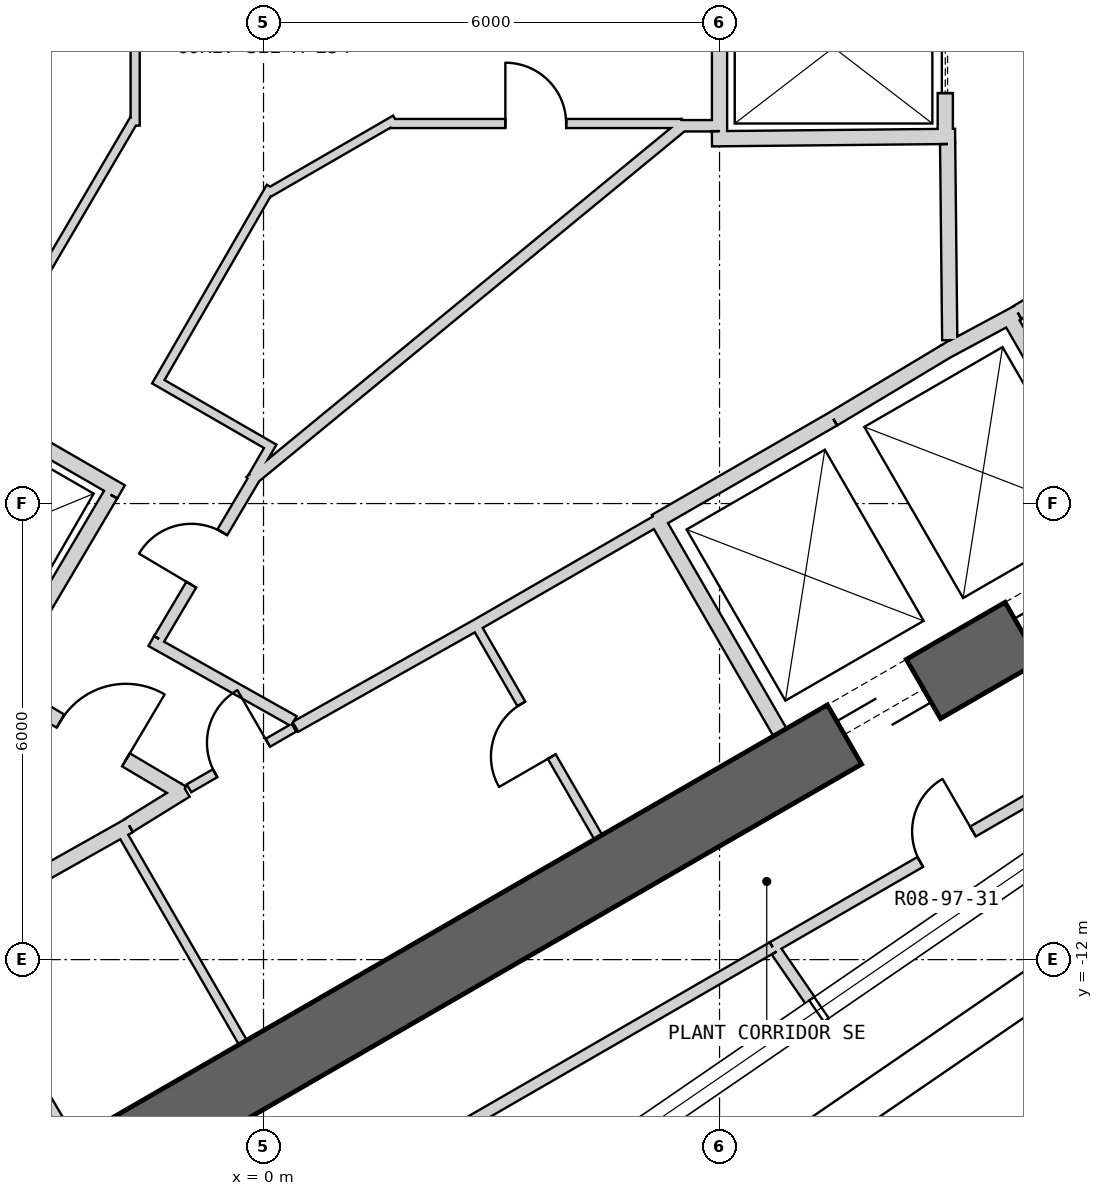
"""IFC4 building model, lengths in metres.
Left out: names, types, materials, properties, quantities, classifications, styles, units other than length and angle.
Written with IfcOpenShell. Run it as: python <this file> out.ifc"""

import sys

from ifc_helpers import new_model, si_unit, direction, frame, frame_2d, origin, place, context, subcontext, project, spatial, rectangle, extrude, element, fill, save


model = new_model("IFC4")
c1 = context("Model", 3, precision=1e-05, world=origin(), true_north=direction((0.0, 1.0)))
c2 = subcontext(c1, "Body", "Model", "MODEL_VIEW")
j1 = project(units=[si_unit("LENGTHUNIT", "METRE"), si_unit("PLANEANGLEUNIT", "RADIAN")], contexts=[c1])
p1 = place(None, origin())
s1 = spatial("IfcSite", under=j1, at=p1, CompositionType="ELEMENT")
p2 = place(p1, origin())
s2 = spatial("IfcBuilding", under=s1, at=p2, CompositionType="ELEMENT")
p3 = place(p2, frame((0.0, 0.0, 430.3)))
s3 = spatial("IfcBuildingStorey", under=s2, at=p3, CompositionType="ELEMENT", Elevation=430.3)
p4 = place(p3, frame((-7.825, -17.97, 0.0), z_axis=(0.0, 0.0, 1.0), x_axis=(0.866028369851, 0.499994862586, 0.0)))
e1 = element("IfcWall", 1, at=p4, inside=s3, PredefinedType="SHEAR", context=c2, shape_type="SweptSolid", body=[
    extrude(rectangle(XDim=31.523, YDim=0.9, at=frame_2d((15.762, 0.0))), origin(), (0.0, 0.0, 1.0), 5.0),
])
p5 = place(p4, frame((17.862, 0.0, 0.0)))
e2 = element("IfcOpeningElement", 2, at=p5, cuts=e1, PredefinedType="OPENING", context=c2, shape_type="SweptSolid", body=[
    extrude(rectangle(XDim=1.2, YDim=2.4, at=frame_2d((0.6, 1.2))), frame((0.0, 0.46, 0.0), z_axis=(0.0, -1.0, 0.0), x_axis=(1.0, 0.0, 0.0)), (0.0, 0.0, 1.0), 0.92),
])
p6 = place(p4, frame((20.562, 0.0, 0.0)))
e3 = element("IfcOpeningElement", 3, at=p6, cuts=e1, PredefinedType="OPENING", context=c2, shape_type="SweptSolid", body=[
    extrude(rectangle(XDim=1.2, YDim=2.4, at=frame_2d((0.6, 1.2))), frame((0.0, 0.46, 0.0), z_axis=(0.0, -1.0, 0.0), x_axis=(1.0, 0.0, 0.0)), (0.0, 0.0, 1.0), 0.92),
])
p7 = place(p4, frame((26.712, 0.0, 0.0)))
e4 = element("IfcOpeningElement", 4, at=p7, cuts=e1, PredefinedType="OPENING", context=c2, shape_type="SweptSolid", body=[
    extrude(rectangle(XDim=1.2, YDim=2.4, at=frame_2d((0.6, 1.2))), frame((0.0, 0.46, 0.0), z_axis=(0.0, -1.0, 0.0), x_axis=(1.0, 0.0, 0.0)), (0.0, 0.0, 1.0), 0.92),
])
p8 = place(p4, frame((3.612, 0.0, 0.0)))
e5 = element("IfcOpeningElement", 5, at=p8, cuts=e1, PredefinedType="OPENING", context=c2, shape_type="SweptSolid", body=[
    extrude(rectangle(XDim=1.2, YDim=2.4, at=frame_2d((0.6, 1.2))), frame((0.0, 0.46, 0.0), z_axis=(0.0, -1.0, 0.0), x_axis=(1.0, 0.0, 0.0)), (0.0, 0.0, 1.0), 0.92),
])
p9 = place(p3, frame((6.795, -9.01, 0.0), z_axis=(0.0, 0.0, 1.0), x_axis=(-0.499984717929, 0.866034226713, 0.0)))
e6 = element("IfcWall", 6, at=p9, inside=s3, PredefinedType="PLUMBINGWALL", context=c2, shape_type="SweptSolid", body=[
    extrude(rectangle(XDim=3.25, YDim=0.2, at=frame_2d((1.625, 0.0))), origin(), (0.0, 0.0, 1.0), 4.75),
])
p10 = place(p3, frame((5.159, -6.236, 0.0), z_axis=(0.0, 0.0, 1.0), x_axis=(0.866036505625, 0.499980770555, 0.0)))
e7 = element("IfcWall", 7, at=p10, inside=s3, PredefinedType="PLUMBINGWALL", context=c2, shape_type="SweptSolid", body=[
    extrude(rectangle(XDim=2.7, YDim=0.2, at=frame_2d((1.35, 0.0))), origin(), (0.0, 0.0, 1.0), 4.75),
])
p11 = place(p3, frame((9.795, -3.525, 0.0), z_axis=(0.0, 0.0, 1.0), x_axis=(0.499984717929, -0.866034226713, 0.0)))
e8 = element("IfcWall", 8, at=p11, inside=s3, PredefinedType="PLUMBINGWALL", context=c2, shape_type="SweptSolid", body=[
    extrude(rectangle(XDim=3.25, YDim=0.2, at=frame_2d((1.625, 0.0))), origin(), (0.0, 0.0, 1.0), 4.75),
])
p12 = place(p3, frame((8.974, -3.999, 0.0), z_axis=(0.0, 0.0, 1.0), x_axis=(0.880907015104, 0.473289373154, 0.0)))
e9 = element("IfcWall", 9, at=p12, inside=s3, PredefinedType="PLUMBINGWALL", context=c2, shape_type="SweptSolid", body=[
    extrude(rectangle(XDim=1.078, YDim=0.2, at=frame_2d((0.539, 0.0))), origin(), (0.0, 0.0, 1.0), 4.75),
])
p13 = place(p3, frame((7.497, -4.886, 0.0), z_axis=(0.0, 0.0, 1.0), x_axis=(0.857516281273, 0.51445682749, 0.0)))
e10 = element("IfcWall", 10, at=p13, inside=s3, PredefinedType="PLUMBINGWALL", context=c2, shape_type="SweptSolid", body=[
    extrude(rectangle(XDim=1.845, YDim=0.2, at=frame_2d((0.922, 0.0))), origin(), (0.0, 0.0, 1.0), 4.75),
])
p14 = place(p3, frame((8.97, 1.2, 0.0), z_axis=(0.0, 0.0, 1.0), x_axis=(0.0, -1.0, 0.0)))
e11 = element("IfcWall", 11, at=p14, inside=s3, PredefinedType="PLUMBINGWALL", context=c2, shape_type="SweptSolid", body=[
    extrude(rectangle(XDim=2.4, YDim=0.2, at=frame_2d((1.2, 0.0))), origin(), (0.0, 0.0, 1.0), 4.75),
])
p15 = place(p14, frame((0.6, 0.0, 0.0)))
e12 = element("IfcOpeningElement", 12, at=p15, cuts=e11, PredefinedType="OPENING", context=c2, shape_type="SweptSolid", body=[
    extrude(rectangle(XDim=1.2, YDim=2.4, at=frame_2d((0.6, 1.2))), frame((0.0, 0.11, 0.0), z_axis=(0.0, -1.0, 0.0), x_axis=(1.0, 0.0, 0.0)), (0.0, 0.0, 1.0), 0.22),
])
p16 = place(p3, frame((9.1, -1.169, 0.0), z_axis=(0.0, 0.0, 1.0), x_axis=(-0.999950064753, -0.009993397809, 0.0)))
e13 = element("IfcWall", 13, at=p16, inside=s3, PredefinedType="PLUMBINGWALL", context=c2, shape_type="SweptSolid", body=[
    extrude(rectangle(XDim=3.2, YDim=0.2, at=frame_2d((1.6, 0.0))), origin(), (0.0, 0.0, 1.0), 4.75),
])
p17 = place(p3, frame((6.0, -1.1, 0.0), z_axis=(0.0, 0.0, 1.0), x_axis=(0.0, 1.0, 0.0)))
e14 = element("IfcWall", 14, at=p17, inside=s3, PredefinedType="PLUMBINGWALL", context=c2, shape_type="SweptSolid", body=[
    extrude(rectangle(XDim=2.4, YDim=0.2, at=frame_2d((1.2, 0.0))), origin(), (0.0, 0.0, 1.0), 4.75),
])
p18 = place(p3, frame((-3.953, -4.646, 0.0), z_axis=(0.0, 0.0, 1.0), x_axis=(0.866024647952, -0.500001309137, 0.0)))
e15 = element("IfcWall", 15, at=p18, inside=s3, PredefinedType="PLUMBINGWALL", context=c2, shape_type="SweptSolid", body=[
    extrude(rectangle(XDim=2.4, YDim=0.2, at=frame_2d((1.2, 0.0))), origin(), (0.0, 0.0, 1.0), 4.75),
])
p19 = place(p3, frame((-2.012, -5.882, 0.0), z_axis=(0.0, 0.0, 1.0), x_axis=(-0.508619639323, -0.860991325447, 0.0)))
e16 = element("IfcWall", 16, at=p19, inside=s3, PredefinedType="PLUMBINGWALL", context=c2, shape_type="SweptSolid", body=[
    extrude(rectangle(XDim=3.0, YDim=0.2, at=frame_2d((1.5, 0.0))), origin(), (0.0, 0.0, 1.0), 4.75),
])
p20 = place(p3, frame((-1.897, -10.275, 0.0), z_axis=(0.0, 0.0, 1.0), x_axis=(0.499984717929, -0.866034226713, 0.0)))
e17 = element("IfcWall", 17, at=p20, inside=s3, PredefinedType="PARTITIONING", context=c2, shape_type="SweptSolid", body=[
    extrude(rectangle(XDim=3.25, YDim=0.12, at=frame_2d((1.625, 0.0))), origin(), (0.0, 0.0, 1.0), 4.75),
])
p21 = place(p3, frame((-4.26, -11.524, 0.0), z_axis=(0.0, 0.0, 1.0), x_axis=(0.507997497166, -0.861358544901, 0.0)))
e18 = element("IfcWall", 18, at=p21, inside=s3, PredefinedType="PARTITIONING", context=c2, shape_type="SweptSolid", body=[
    extrude(rectangle(XDim=3.35, YDim=0.2, at=frame_2d((1.675, 0.0))), origin(), (0.0, 0.0, 1.0), 4.75),
])
p22 = place(p21, frame((1.325, 0.0, 0.0)))
e19 = element("IfcOpeningElement", 19, at=p22, cuts=e18, PredefinedType="OPENING", context=c2, shape_type="SweptSolid", body=[
    extrude(rectangle(XDim=0.8, YDim=2.1, at=frame_2d((0.4, 1.05))), frame((0.0, 0.11, 0.0), z_axis=(0.0, -1.0, 0.0), x_axis=(1.0, 0.0, 0.0)), (0.0, 0.0, 1.0), 0.22),
])
p23 = place(p3, frame((-1.769, -10.237, 0.0), z_axis=(0.0, 0.0, 1.0), x_axis=(-0.871534483978, -0.490334215854, 0.0)))
e20 = element("IfcWall", 20, at=p23, inside=s3, PredefinedType="PARTITIONING", context=c2, shape_type="SweptSolid", body=[
    extrude(rectangle(XDim=2.7, YDim=0.2, at=frame_2d((1.35, 0.0))), origin(), (0.0, 0.0, 1.0), 4.75),
])
p24 = place(p3, frame((4.405, -10.389, 0.0), z_axis=(0.0, 0.0, 1.0), x_axis=(-0.500017246033, 0.866015446554, 0.0)))
e21 = element("IfcWall", 21, at=p24, inside=s3, PredefinedType="PARTITIONING", context=c2, shape_type="SweptSolid", body=[
    extrude(rectangle(XDim=3.25, YDim=0.12, at=frame_2d((1.625, 0.0))), origin(), (0.0, 0.0, 1.0), 4.75),
])
p25 = place(p24, frame((1.225, 0.0, 0.0)))
e22 = element("IfcOpeningElement", 22, at=p25, cuts=e21, PredefinedType="OPENING", context=c2, shape_type="SweptSolid", body=[
    extrude(rectangle(XDim=0.8, YDim=2.1, at=frame_2d((0.4, 1.05))), frame((0.0, 0.07, 0.0), z_axis=(0.0, -1.0, 0.0), x_axis=(1.0, 0.0, 0.0)), (0.0, 0.0, 1.0), 0.14),
])
p26 = place(p3, frame((-1.024, -9.771, 0.0), z_axis=(0.0, 0.0, 1.0), x_axis=(-0.850348075135, -0.526220629693, 0.0)))
e23 = element("IfcWall", 23, at=p26, inside=s3, PredefinedType="PARTITIONING", context=c2, shape_type="SweptSolid", body=[
    extrude(rectangle(XDim=0.878, YDim=0.2, at=frame_2d((0.439, 0.0))), origin(), (0.0, 0.0, 1.0), 4.75),
])
p27 = place(p3, frame((0.42, -8.938, 0.0), z_axis=(0.0, 0.0, 1.0), x_axis=(0.871409832999, 0.490555708306, 0.0)))
e24 = element("IfcWall", 24, at=p27, inside=s3, PredefinedType="PLUMBINGWALL", context=c2, shape_type="SweptSolid", body=[
    extrude(rectangle(XDim=2.755, YDim=0.15, at=frame_2d((1.377, 0.0))), origin(), (0.0, 0.0, 1.0), 4.75),
])
p28 = place(p3, frame((0.4, -8.949, 0.0), z_axis=(0.0, 0.0, 1.0), x_axis=(-0.866019818373, -0.500009674092, 0.0)))
e25 = element("IfcWall", 25, at=p28, inside=s3, PredefinedType="PARTITIONING", context=c2, shape_type="SweptSolid", body=[
    extrude(rectangle(XDim=1.594, YDim=0.12, at=frame_2d((0.797, 0.0))), origin(), (0.0, 0.0, 1.0), 4.75),
])
p29 = place(p28, frame((0.397, 0.0, 0.0)))
e26 = element("IfcOpeningElement", 26, at=p29, cuts=e25, PredefinedType="OPENING", context=c2, shape_type="SweptSolid", body=[
    extrude(rectangle(XDim=0.8, YDim=2.1, at=frame_2d((0.4, 1.05))), frame((0.0, 0.07, 0.0), z_axis=(0.0, -1.0, 0.0), x_axis=(1.0, 0.0, 0.0)), (0.0, 0.0, 1.0), 0.14),
])
p30 = place(p3, frame((2.821, -7.586, 0.0), z_axis=(0.0, 0.0, 1.0), x_axis=(0.866019956843, 0.50000943426, 0.0)))
e27 = element("IfcWall", 27, at=p30, inside=s3, PredefinedType="PLUMBINGWALL", context=c2, shape_type="SweptSolid", body=[
    extrude(rectangle(XDim=2.7, YDim=0.15, at=frame_2d((1.35, 0.0))), origin(), (0.0, 0.0, 1.0), 4.75),
])
p31 = place(p3, frame((12.245, -2.109, 0.0), z_axis=(0.0, 0.0, 1.0), x_axis=(-0.860414880418, -0.509594185166, 0.0)))
e28 = element("IfcWall", 28, at=p31, inside=s3, PredefinedType="PARTITIONING", context=c2, shape_type="SweptSolid", body=[
    extrude(rectangle(XDim=2.7, YDim=0.2, at=frame_2d((1.35, 0.0))), origin(), (0.0, 0.0, 1.0), 4.75),
])
p32 = place(p3, frame((9.029, -3.851, 0.0), z_axis=(0.0, 0.0, 1.0), x_axis=(-0.010784614026, 0.999941844359, 0.0)))
e29 = element("IfcWall", 29, at=p32, inside=s3, PredefinedType="PARTITIONING", context=c2, shape_type="SweptSolid", body=[
    extrude(rectangle(XDim=2.581, YDim=0.2, at=frame_2d((1.291, 0.0))), origin(), (0.0, 0.0, 1.0), 4.75),
])
p33 = place(p3, frame((-3.401, -8.43, 0.0), z_axis=(0.0, 0.0, 1.0), x_axis=(0.860617791406, -0.509251428192, 0.0)))
e30 = element("IfcWall", 30, at=p33, inside=s3, PredefinedType="PARTITIONING", context=c2, shape_type="SweptSolid", body=[
    extrude(rectangle(XDim=2.709, YDim=0.2, at=frame_2d((1.354, 0.0))), origin(), (0.0, 0.0, 1.0), 4.75),
])
p34 = place(p33, frame((0.848, 0.0, 0.0)))
e31 = element("IfcOpeningElement", 31, at=p34, cuts=e30, PredefinedType="OPENING", context=c2, shape_type="SweptSolid", body=[
    extrude(rectangle(XDim=1.0, YDim=2.1, at=frame_2d((0.5, 1.05))), frame((0.0, 0.11, 0.0), z_axis=(0.0, -1.0, 0.0), x_axis=(1.0, 0.0, 0.0)), (0.0, 0.0, 1.0), 0.22),
])
p35 = place(p3, frame((-1.689, -1.027, 0.0), z_axis=(0.0, 0.0, 1.0), x_axis=(0.0, 1.0, 0.0)))
e32 = element("IfcWall", 32, at=p35, inside=s3, PredefinedType="PARTITIONING", context=c2, shape_type="SweptSolid", body=[
    extrude(rectangle(XDim=1.933, YDim=0.12, at=frame_2d((0.967, 0.0))), origin(), (0.0, 0.0, 1.0), 4.75),
])
p36 = place(p3, frame((-3.841, -4.595, 0.0), z_axis=(0.0, 0.0, 1.0), x_axis=(0.505883680705, 0.862601705074, 0.0)))
e33 = element("IfcWall", 33, at=p36, inside=s3, PredefinedType="PARTITIONING", context=c2, shape_type="SweptSolid", body=[
    extrude(rectangle(XDim=4.236, YDim=0.12, at=frame_2d((2.118, 0.0))), origin(), (0.0, 0.0, 1.0), 4.75),
])
p37 = place(p3, frame((5.548, -1.0, 0.0), z_axis=(0.0, 0.0, 1.0), x_axis=(-0.772345431507, -0.635202750648, 0.0)))
e34 = element("IfcWall", 34, at=p37, inside=s3, PredefinedType="PLUMBINGWALL", context=c2, shape_type="SweptSolid", body=[
    extrude(rectangle(XDim=7.415, YDim=0.15, at=frame_2d((3.707, 0.0))), origin(), (0.0, 0.0, 1.0), 4.75),
])
p38 = place(p3, frame((-1.477, -7.808, 0.0), z_axis=(0.0, 0.0, 1.0), x_axis=(0.871829948107, -0.48980867855, 0.0)))
e35 = element("IfcWall", 35, at=p38, inside=s3, PredefinedType="PLUMBINGWALL", context=c2, shape_type="SweptSolid", body=[
    extrude(rectangle(XDim=2.152, YDim=0.15, at=frame_2d((1.076, 0.0))), origin(), (0.0, 0.0, 1.0), 4.75),
])
p39 = place(p3, frame((-0.119, -5.664, 0.0), z_axis=(0.0, 0.0, 1.0), x_axis=(-0.509935662771, -0.860212543406, 0.0)))
e36 = element("IfcWall", 36, at=p39, inside=s3, PredefinedType="PLUMBINGWALL", context=c2, shape_type="SweptSolid", body=[
    extrude(rectangle(XDim=2.46, YDim=0.15, at=frame_2d((1.23, 0.0))), origin(), (0.0, 0.0, 1.0), 4.75),
])
p40 = place(p39, frame((0.83, 0.0, 0.0)))
e37 = element("IfcOpeningElement", 37, at=p40, cuts=e36, PredefinedType="OPENING", context=c2, shape_type="SweptSolid", body=[
    extrude(rectangle(XDim=0.8, YDim=2.1, at=frame_2d((0.4, 1.05))), frame((0.0, 0.085, 0.0), z_axis=(0.0, -1.0, 0.0), x_axis=(1.0, 0.0, 0.0)), (0.0, 0.0, 1.0), 0.17),
])
p41 = place(p3, frame((5.9, -1.03, 0.0), z_axis=(0.0, 0.0, 1.0), x_axis=(-1.0, 0.0, 0.0)))
e38 = element("IfcWall", 38, at=p41, inside=s3, PredefinedType="PLUMBINGWALL", context=c2, shape_type="SweptSolid", body=[
    extrude(rectangle(XDim=0.4, YDim=0.15, at=frame_2d((0.2, 0.0))), origin(), (0.0, 0.0, 1.0), 4.75),
])
p42 = place(p3, frame((-0.144, -5.649, 0.0), z_axis=(0.0, 0.0, 1.0), x_axis=(0.499843319224, 0.866115844577, 0.0)))
e39 = element("IfcWall", 39, at=p42, inside=s3, PredefinedType="PARTITIONING", context=c2, shape_type="SweptSolid", body=[
    extrude(rectangle(XDim=0.525, YDim=0.12, at=frame_2d((0.262, 0.0))), origin(), (0.0, 0.0, 1.0), 4.75),
])
p43 = place(p3, frame((-1.436, -4.367, 0.0), z_axis=(0.0, 0.0, 1.0), x_axis=(0.866087547558, -0.499892348375, 0.0)))
e40 = element("IfcWall", 40, at=p43, inside=s3, PredefinedType="PARTITIONING", context=c2, shape_type="SweptSolid", body=[
    extrude(rectangle(XDim=1.7, YDim=0.12, at=frame_2d((0.85, 0.0))), origin(), (0.0, 0.0, 1.0), 4.75),
])
p44 = place(p3, frame((0.095, -1.835, 0.0), z_axis=(0.0, 0.0, 1.0), x_axis=(-0.499980071345, -0.866036909293, 0.0)))
e41 = element("IfcWall", 41, at=p44, inside=s3, PredefinedType="PARTITIONING", context=c2, shape_type="SweptSolid", body=[
    extrude(rectangle(XDim=2.898, YDim=0.12, at=frame_2d((1.449, 0.0))), origin(), (0.0, 0.0, 1.0), 4.75),
])
p45 = place(p3, frame((1.735, -0.948, 0.0), z_axis=(0.0, 0.0, 1.0), x_axis=(-0.865998615205, -0.500046396311, 0.0)))
e42 = element("IfcWall", 42, at=p45, inside=s3, PredefinedType="PARTITIONING", context=c2, shape_type="SweptSolid", body=[
    extrude(rectangle(XDim=1.935, YDim=0.12, at=frame_2d((0.968, 0.0))), origin(), (0.0, 0.0, 1.0), 4.75),
])
p46 = place(p3, frame((5.5, -1.0, 0.0), z_axis=(0.0, 0.0, 1.0), x_axis=(-1.0, 0.0, 0.0)))
e43 = element("IfcWall", 43, at=p46, inside=s3, PredefinedType="PARTITIONING", context=c2, shape_type="SweptSolid", body=[
    extrude(rectangle(XDim=3.836, YDim=0.12, at=frame_2d((1.918, 0.0))), origin(), (0.0, 0.0, 1.0), 4.75),
])
p47 = place(p46, frame((1.518, 0.0, 0.0)))
e44 = element("IfcOpeningElement", 44, at=p47, cuts=e43, PredefinedType="OPENING", context=c2, shape_type="SweptSolid", body=[
    extrude(rectangle(XDim=0.8, YDim=2.1, at=frame_2d((0.4, 1.05))), frame((0.0, 0.07, 0.0), z_axis=(0.0, -1.0, 0.0), x_axis=(1.0, 0.0, 0.0)), (0.0, 0.0, 1.0), 0.14),
])
p48 = place(p3, frame((-7.213, -19.868, 0.0), z_axis=(0.0, 0.0, 1.0), x_axis=(0.866028156973, 0.499995231308, 0.0)))
e45 = element("IfcWall", 45, at=p48, inside=s3, PredefinedType="PLUMBINGWALL", context=c2, shape_type="SweptSolid", body=[
    extrude(rectangle(XDim=16.063, YDim=0.15, at=frame_2d((8.032, 0.0))), origin(), (0.0, 0.0, 1.0), 4.75),
])
p49 = place(p48, frame((7.675, 0.0, 0.0)))
e46 = element("IfcOpeningElement", 46, at=p49, cuts=e45, PredefinedType="OPENING", context=c2, shape_type="SweptSolid", body=[
    extrude(rectangle(XDim=0.8, YDim=2.1, at=frame_2d((0.4, 1.05))), frame((0.0, 0.085, 0.0), z_axis=(0.0, -1.0, 0.0), x_axis=(1.0, 0.0, 0.0)), (0.0, 0.0, 1.0), 0.17),
])
p50 = place(p3, frame((6.698, -11.837, 0.0), z_axis=(0.0, 0.0, 1.0), x_axis=(0.866022938386, 0.500004270171, 0.0)))
e47 = element("IfcWall", 47, at=p50, inside=s3, PredefinedType="PLUMBINGWALL", context=c2, shape_type="SweptSolid", body=[
    extrude(rectangle(XDim=16.148, YDim=0.15, at=frame_2d((8.074, 0.0))), origin(), (0.0, 0.0, 1.0), 4.75),
])
p51 = place(p50, frame((2.243, 0.0, 0.0)))
e48 = element("IfcOpeningElement", 48, at=p51, cuts=e47, PredefinedType="OPENING", context=c2, shape_type="SweptSolid", body=[
    extrude(rectangle(XDim=0.8, YDim=2.1, at=frame_2d((0.4, 1.05))), frame((0.0, 0.085, 0.0), z_axis=(0.0, -1.0, 0.0), x_axis=(1.0, 0.0, 0.0)), (0.0, 0.0, 1.0), 0.17),
])
p52 = place(p3, frame((7.213, -12.568, 0.0), z_axis=(0.0, 0.0, 1.0), x_axis=(-0.565933909506, 0.824450611056, 0.0)))
e49 = element("IfcWall", 49, at=p52, inside=s3, PredefinedType="PLUMBINGWALL", context=c2, shape_type="SweptSolid", body=[
    extrude(rectangle(XDim=0.819, YDim=0.15, at=frame_2d((0.409, 0.0))), origin(), (0.0, 0.0, 1.0), 4.75),
])
p53 = place(p15, origin())
e50 = element("IfcDoor", 50, at=p53, inside=s3, OperationType="SLIDING_TO_LEFT", PredefinedType="USERDEFINED", context=c2, shape_type="SweptSolid", body=[
    extrude(rectangle(XDim=1.2, YDim=2.4, at=frame_2d((0.6, 1.2))), frame((0.0, 0.025, 0.0), z_axis=(0.0, -1.0, 0.0), x_axis=(1.0, 0.0, 0.0)), (0.0, 0.0, 1.0), 0.05),
])
fill(e12, e50)
p54 = place(p34, origin())
e51 = element("IfcDoor", 51, at=p54, inside=s3, OperationType="SINGLE_SWING_RIGHT", PredefinedType="USERDEFINED", context=c2, shape_type="SweptSolid", body=[
    extrude(rectangle(XDim=1.0, YDim=2.1, at=frame_2d((0.5, 1.05))), frame((0.0, 0.025, 0.0), z_axis=(0.0, -1.0, 0.0), x_axis=(1.0, 0.0, 0.0)), (0.0, 0.0, 1.0), 0.05),
])
fill(e31, e51)
p55 = place(p40, origin())
e52 = element("IfcDoor", 52, at=p55, inside=s3, OperationType="SINGLE_SWING_RIGHT", PredefinedType="USERDEFINED", context=c2, shape_type="SweptSolid", body=[
    extrude(rectangle(XDim=0.8, YDim=2.1, at=frame_2d((0.4, 1.05))), frame((0.0, 0.025, 0.0), z_axis=(0.0, -1.0, 0.0), x_axis=(1.0, 0.0, 0.0)), (0.0, 0.0, 1.0), 0.05),
])
fill(e37, e52)
p56 = place(p47, origin())
e53 = element("IfcDoor", 53, at=p56, inside=s3, OperationType="SINGLE_SWING_RIGHT", PredefinedType="USERDEFINED", context=c2, shape_type="SweptSolid", body=[
    extrude(rectangle(XDim=0.8, YDim=2.1, at=frame_2d((0.4, 1.05))), frame((0.0, 0.025, 0.0), z_axis=(0.0, -1.0, 0.0), x_axis=(1.0, 0.0, 0.0)), (0.0, 0.0, 1.0), 0.05),
])
fill(e44, e53)
p57 = place(p29, origin())
e54 = element("IfcDoor", 54, at=p57, inside=s3, OperationType="SINGLE_SWING_LEFT", PredefinedType="USERDEFINED", context=c2, shape_type="SweptSolid", body=[
    extrude(rectangle(XDim=0.8, YDim=2.1, at=frame_2d((0.4, 1.05))), frame((0.0, 0.025, 0.0), z_axis=(0.0, -1.0, 0.0), x_axis=(1.0, 0.0, 0.0)), (0.0, 0.0, 1.0), 0.05),
])
fill(e26, e54)
p58 = place(p25, origin())
e55 = element("IfcDoor", 55, at=p58, inside=s3, OperationType="SINGLE_SWING_LEFT", PredefinedType="USERDEFINED", context=c2, shape_type="SweptSolid", body=[
    extrude(rectangle(XDim=0.8, YDim=2.1, at=frame_2d((0.4, 1.05))), frame((0.0, 0.025, 0.0), z_axis=(0.0, -1.0, 0.0), x_axis=(1.0, 0.0, 0.0)), (0.0, 0.0, 1.0), 0.05),
])
fill(e22, e55)
p59 = place(p51, origin())
e56 = element("IfcDoor", 56, at=p59, inside=s3, OperationType="SINGLE_SWING_RIGHT", PredefinedType="USERDEFINED", context=c2, shape_type="SweptSolid", body=[
    extrude(rectangle(XDim=0.8, YDim=2.1, at=frame_2d((0.4, 1.05))), frame((0.0, 0.025, 0.0), z_axis=(0.0, -1.0, 0.0), x_axis=(1.0, 0.0, 0.0)), (0.0, 0.0, 1.0), 0.05),
])
fill(e48, e56)
p60 = place(p5, origin())
e57 = element("IfcDoor", 57, at=p60, inside=s3, OperationType="SLIDING_TO_LEFT", PredefinedType="USERDEFINED", context=c2, shape_type="SweptSolid", body=[
    extrude(rectangle(XDim=1.2, YDim=2.4, at=frame_2d((0.6, 1.2))), frame((0.0, 0.025, 0.0), z_axis=(0.0, -1.0, 0.0), x_axis=(1.0, 0.0, 0.0)), (0.0, 0.0, 1.0), 0.05),
])
fill(e2, e57)
p61 = place(p6, origin())
e58 = element("IfcDoor", 58, at=p61, inside=s3, OperationType="SLIDING_TO_LEFT", PredefinedType="USERDEFINED", context=c2, shape_type="SweptSolid", body=[
    extrude(rectangle(XDim=1.2, YDim=2.4, at=frame_2d((0.6, 1.2))), frame((0.0, 0.025, 0.0), z_axis=(0.0, -1.0, 0.0), x_axis=(1.0, 0.0, 0.0)), (0.0, 0.0, 1.0), 0.05),
])
fill(e3, e58)
save(model, sys.argv[1])
